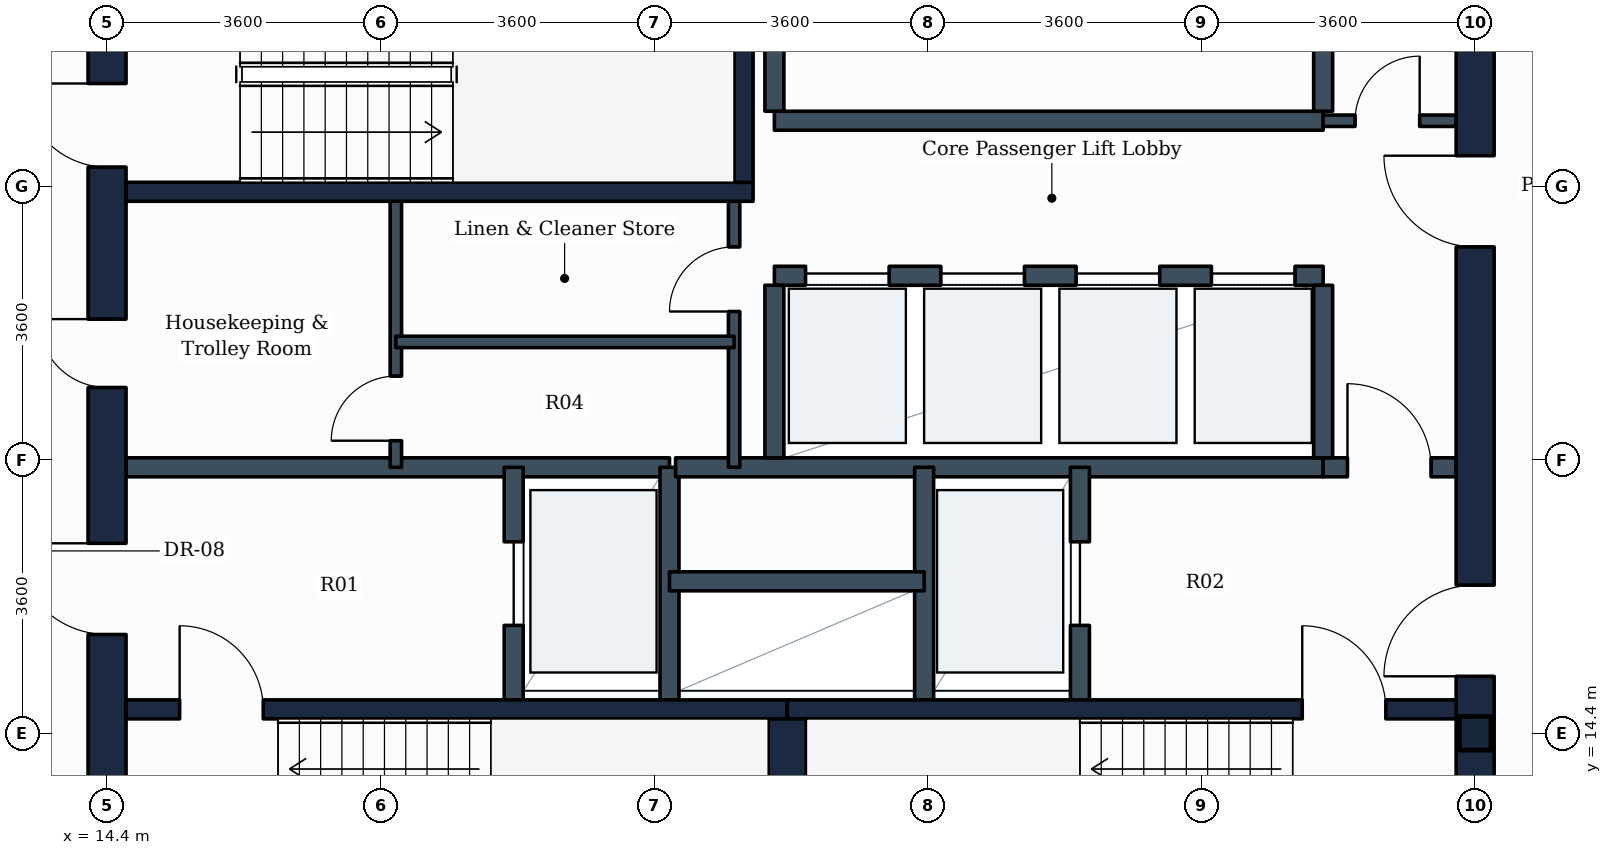
"""IFC4 building model, lengths in metres.
Left out: names, types, materials, properties, quantities, classifications, styles, units other than length and angle.
Written with IfcOpenShell. Run it as: python <this file> out.ifc"""

import sys

from ifc_helpers import new_model, si_unit, direction, frame, frame_2d, origin, origin_2d, place, context, subcontext, project, spatial, rectangle, i_section, extrude, element, fill, save


model = new_model("IFC4")
c1 = context("Model", 3, precision=1e-05, world=origin(), true_north=direction((0.0, 1.0)))
c2 = subcontext(c1, "Body", "Model", "MODEL_VIEW")
j1 = project(units=[si_unit("LENGTHUNIT", "METRE"), si_unit("PLANEANGLEUNIT", "RADIAN")], contexts=[c1])
p1 = place(None, origin())
s1 = spatial("IfcSite", under=j1, at=p1, CompositionType="ELEMENT")
p2 = place(p1, origin())
s2 = spatial("IfcBuilding", under=s1, at=p2, CompositionType="ELEMENT")
p3 = place(p2, frame((0.0, 0.0, 154.2)))
s3 = spatial("IfcBuildingStorey", under=s2, at=p3, CompositionType="ELEMENT", Elevation=154.2)
p4 = place(p3, frame((32.4, 14.4, 0.0), z_axis=(0.0, 0.0, 1.0), x_axis=(1.0, 0.0, 0.0)))
e1 = element("IfcColumn", 1, at=p4, inside=s3, PredefinedType="COLUMN", context=c2, shape_type="SweptSolid", body=[
    extrude(i_section(OverallWidth=0.416, OverallDepth=0.442, WebThickness=0.025, FlangeThickness=0.041, FilletRadius=0.015, at=origin_2d()), origin(), (0.0, 0.0, 1.0), 3.8),
])
p5 = place(p3, frame((14.4, 10.8, 0.0), z_axis=(0.0, 0.0, 1.0), x_axis=(0.0, 1.0, 0.0)))
e2 = element("IfcWall", 2, at=p5, inside=s3, PredefinedType="SHEAR", context=c2, shape_type="SweptSolid", body=[
    extrude(rectangle(XDim=14.4, YDim=0.5, at=frame_2d((7.2, 0.0))), origin(), (0.0, 0.0, 1.0), 3.55),
])
p6 = place(p5, frame((11.05, 0.0, 0.0)))
e3 = element("IfcOpeningElement", 3, at=p6, cuts=e2, PredefinedType="OPENING", context=c2, shape_type="SweptSolid", body=[
    extrude(rectangle(XDim=1.1, YDim=2.1, at=frame_2d((0.55, 1.05))), frame((0.0, 0.26, 0.0), z_axis=(0.0, -1.0, 0.0), x_axis=(1.0, 0.0, 0.0)), (0.0, 0.0, 1.0), 0.52),
])
p7 = place(p5, frame((4.9, 0.0, 0.0)))
e4 = element("IfcOpeningElement", 4, at=p7, cuts=e2, PredefinedType="OPENING", context=c2, shape_type="SweptSolid", body=[
    extrude(rectangle(XDim=1.2, YDim=2.1, at=frame_2d((0.6, 1.05))), frame((0.0, 0.26, 0.0), z_axis=(0.0, -1.0, 0.0), x_axis=(1.0, 0.0, 0.0)), (0.0, 0.0, 1.0), 0.52),
])
p8 = place(p5, frame((8.15, 0.0, 0.0)))
e5 = element("IfcOpeningElement", 5, at=p8, cuts=e2, PredefinedType="OPENING", context=c2, shape_type="SweptSolid", body=[
    extrude(rectangle(XDim=0.9, YDim=2.1, at=frame_2d((0.45, 1.05))), frame((0.0, 0.26, 0.0), z_axis=(0.0, -1.0, 0.0), x_axis=(1.0, 0.0, 0.0)), (0.0, 0.0, 1.0), 0.52),
])
p9 = place(p3, frame((32.4, 10.8, 0.0), z_axis=(0.0, 0.0, 1.0), x_axis=(0.0, 1.0, 0.0)))
e6 = element("IfcWall", 6, at=p9, inside=s3, PredefinedType="SHEAR", context=c2, shape_type="SweptSolid", body=[
    extrude(rectangle(XDim=14.4, YDim=0.5, at=frame_2d((7.2, 0.0))), origin(), (0.0, 0.0, 1.0), 3.55),
])
p10 = place(p9, frame((4.35, 0.0, 0.0)))
e7 = element("IfcOpeningElement", 7, at=p10, cuts=e6, PredefinedType="OPENING", context=c2, shape_type="SweptSolid", body=[
    extrude(rectangle(XDim=1.2, YDim=2.1, at=frame_2d((0.6, 1.05))), frame((0.0, 0.26, 0.0), z_axis=(0.0, -1.0, 0.0), x_axis=(1.0, 0.0, 0.0)), (0.0, 0.0, 1.0), 0.52),
])
p11 = place(p9, frame((10.0, 0.0, 0.0)))
e8 = element("IfcOpeningElement", 8, at=p11, cuts=e6, PredefinedType="OPENING", context=c2, shape_type="SweptSolid", body=[
    extrude(rectangle(XDim=1.2, YDim=2.1, at=frame_2d((0.6, 1.05))), frame((0.0, 0.26, 0.0), z_axis=(0.0, -1.0, 0.0), x_axis=(1.0, 0.0, 0.0)), (0.0, 0.0, 1.0), 0.52),
])
p12 = place(p3, frame((14.65, 14.715, 0.0), z_axis=(0.0, 0.0, 1.0), x_axis=(1.0, 0.0, 0.0)))
e9 = element("IfcWall", 9, at=p12, inside=s3, PredefinedType="SHEAR", context=c2, shape_type="SweptSolid", body=[
    extrude(rectangle(XDim=8.7, YDim=0.25, at=frame_2d((4.35, 0.0))), origin(), (0.0, 0.0, 1.0), 3.55),
])
p13 = place(p12, frame((0.705, 0.0, 0.0)))
e10 = element("IfcOpeningElement", 10, at=p13, cuts=e9, PredefinedType="OPENING", context=c2, shape_type="SweptSolid", body=[
    extrude(rectangle(XDim=1.1, YDim=2.1, at=frame_2d((0.55, 1.05))), frame((0.0, 0.135, 0.0), z_axis=(0.0, -1.0, 0.0), x_axis=(1.0, 0.0, 0.0)), (0.0, 0.0, 1.0), 0.27),
])
p14 = place(p3, frame((23.35, 14.715, 0.0), z_axis=(0.0, 0.0, 1.0), x_axis=(1.0, 0.0, 0.0)))
e11 = element("IfcWall", 11, at=p14, inside=s3, PredefinedType="SHEAR", context=c2, shape_type="SweptSolid", body=[
    extrude(rectangle(XDim=8.8, YDim=0.25, at=frame_2d((4.4, 0.0))), origin(), (0.0, 0.0, 1.0), 3.55),
])
p15 = place(p14, frame((6.775, 0.0, 0.0)))
e12 = element("IfcOpeningElement", 12, at=p15, cuts=e11, PredefinedType="OPENING", context=c2, shape_type="SweptSolid", body=[
    extrude(rectangle(XDim=1.1, YDim=2.1, at=frame_2d((0.55, 1.05))), frame((0.0, 0.135, 0.0), z_axis=(0.0, -1.0, 0.0), x_axis=(1.0, 0.0, 0.0)), (0.0, 0.0, 1.0), 0.27),
])
p16 = place(p3, frame((23.35, 11.75, 0.0), z_axis=(0.0, 0.0, 1.0), x_axis=(0.0, 1.0, 0.0)))
e13 = element("IfcWall", 13, at=p16, inside=s3, PredefinedType="SHEAR", context=c2, shape_type="SweptSolid", body=[
    extrude(rectangle(XDim=2.84, YDim=0.5, at=frame_2d((1.42, 0.0))), origin(), (0.0, 0.0, 1.0), 3.55),
])
p17 = place(p3, frame((14.65, 21.525, 0.0), z_axis=(0.0, 0.0, 1.0), x_axis=(1.0, 0.0, 0.0)))
e14 = element("IfcWall", 14, at=p17, inside=s3, PredefinedType="SHEAR", context=c2, shape_type="SweptSolid", body=[
    extrude(rectangle(XDim=8.25, YDim=0.25, at=frame_2d((4.125, 0.0))), origin(), (0.0, 0.0, 1.0), 3.55),
])
p18 = place(p3, frame((22.775, 21.65, 0.0), z_axis=(0.0, 0.0, 1.0), x_axis=(0.0, 1.0, 0.0)))
e15 = element("IfcWall", 15, at=p18, inside=s3, PredefinedType="SHEAR", context=c2, shape_type="SweptSolid", body=[
    extrude(rectangle(XDim=2.84, YDim=0.25, at=frame_2d((1.42, 0.0))), origin(), (0.0, 0.0, 1.0), 3.55),
])
p19 = place(p3, frame((14.65, 17.9, 0.0), z_axis=(0.0, 0.0, 1.0), x_axis=(1.0, 0.0, 0.0)))
e16 = element("IfcWall", 16, at=p19, inside=s3, PredefinedType="PARTITIONING", context=c2, shape_type="SweptSolid", body=[
    extrude(rectangle(XDim=7.15, YDim=0.25, at=frame_2d((3.575, 0.0))), origin(), (0.0, 0.0, 1.0), 3.535),
])
p20 = place(p3, frame((19.75, 14.84, 0.0), z_axis=(0.0, 0.0, 1.0), x_axis=(0.0, 1.0, 0.0)))
e17 = element("IfcWall", 17, at=p20, inside=s3, PredefinedType="PARTITIONING", context=c2, shape_type="SweptSolid", body=[
    extrude(rectangle(XDim=3.06, YDim=0.25, at=frame_2d((1.53, 0.0))), origin(), (0.0, 0.0, 1.0), 3.535),
])
p21 = place(p20, frame((0.98, 0.0, 0.0)))
e18 = element("IfcOpeningElement", 18, at=p21, cuts=e17, PredefinedType="OPENING", context=c2, shape_type="SweptSolid", body=[
    extrude(rectangle(XDim=1.1, YDim=2.1, at=frame_2d((0.55, 1.05))), frame((0.0, 0.135, 0.0), z_axis=(0.0, -1.0, 0.0), x_axis=(1.0, 0.0, 0.0)), (0.0, 0.0, 1.0), 0.27),
])
p22 = place(p3, frame((21.8, 14.84, 0.0), z_axis=(0.0, 0.0, 1.0), x_axis=(0.0, 1.0, 0.0)))
e19 = element("IfcWall", 19, at=p22, inside=s3, PredefinedType="PARTITIONING", context=c2, shape_type="SweptSolid", body=[
    extrude(rectangle(XDim=3.06, YDim=0.25, at=frame_2d((1.53, 0.0))), origin(), (0.0, 0.0, 1.0), 3.535),
])
p23 = place(p3, frame((21.88, 17.9, 0.0), z_axis=(0.0, 0.0, 1.0), x_axis=(1.0, 0.0, 0.0)))
e20 = element("IfcWall", 20, at=p23, inside=s3, PredefinedType="PARTITIONING", context=c2, shape_type="SweptSolid", body=[
    extrude(rectangle(XDim=8.52, YDim=0.25, at=frame_2d((4.26, 0.0))), origin(), (0.0, 0.0, 1.0), 3.535),
])
p24 = place(p3, frame((30.4, 17.9, 0.0), z_axis=(0.0, 0.0, 1.0), x_axis=(1.0, 0.0, 0.0)))
e21 = element("IfcWall", 21, at=p24, inside=s3, PredefinedType="PARTITIONING", context=c2, shape_type="SweptSolid", body=[
    extrude(rectangle(XDim=1.75, YDim=0.25, at=frame_2d((0.875, 0.0))), origin(), (0.0, 0.0, 1.0), 3.535),
])
p25 = place(p24, frame((0.32, 0.0, 0.0)))
e22 = element("IfcOpeningElement", 22, at=p25, cuts=e21, PredefinedType="OPENING", context=c2, shape_type="SweptSolid", body=[
    extrude(rectangle(XDim=1.1, YDim=2.1, at=frame_2d((0.55, 1.05))), frame((0.0, 0.135, 0.0), z_axis=(0.0, -1.0, 0.0), x_axis=(1.0, 0.0, 0.0)), (0.0, 0.0, 1.0), 0.27),
])
p26 = place(p3, frame((25.15, 14.84, 0.0), z_axis=(0.0, 0.0, 1.0), x_axis=(0.0, 1.0, 0.0)))
e23 = element("IfcWall", 23, at=p26, inside=s3, PredefinedType="PARTITIONING", context=c2, shape_type="SweptSolid", body=[
    extrude(rectangle(XDim=3.06, YDim=0.25, at=frame_2d((1.53, 0.0))), origin(), (0.0, 0.0, 1.0), 3.535),
])
p27 = place(p3, frame((27.2, 14.84, 0.0), z_axis=(0.0, 0.0, 1.0), x_axis=(0.0, 1.0, 0.0)))
e24 = element("IfcWall", 24, at=p27, inside=s3, PredefinedType="PARTITIONING", context=c2, shape_type="SweptSolid", body=[
    extrude(rectangle(XDim=3.06, YDim=0.25, at=frame_2d((1.53, 0.0))), origin(), (0.0, 0.0, 1.0), 3.535),
])
p28 = place(p27, frame((0.98, 0.0, 0.0)))
e25 = element("IfcOpeningElement", 25, at=p28, cuts=e24, PredefinedType="OPENING", context=c2, shape_type="SweptSolid", body=[
    extrude(rectangle(XDim=1.1, YDim=2.1, at=frame_2d((0.55, 1.05))), frame((0.0, 0.135, 0.0), z_axis=(0.0, -1.0, 0.0), x_axis=(1.0, 0.0, 0.0)), (0.0, 0.0, 1.0), 0.27),
])
p29 = place(p3, frame((21.8, 16.4, 0.0), z_axis=(0.0, 0.0, 1.0), x_axis=(1.0, 0.0, 0.0)))
e26 = element("IfcWall", 26, at=p29, inside=s3, PredefinedType="PARTITIONING", context=c2, shape_type="SweptSolid", body=[
    extrude(rectangle(XDim=3.35, YDim=0.25, at=frame_2d((1.675, 0.0))), origin(), (0.0, 0.0, 1.0), 3.535),
])
p30 = place(p3, frame((23.18, 20.42, 0.0), z_axis=(0.0, 0.0, 1.0), x_axis=(1.0, 0.0, 0.0)))
e27 = element("IfcWall", 27, at=p30, inside=s3, PredefinedType="PARTITIONING", context=c2, shape_type="SweptSolid", body=[
    extrude(rectangle(XDim=7.22, YDim=0.25, at=frame_2d((3.61, 0.0))), origin(), (0.0, 0.0, 1.0), 3.535),
])
p31 = place(p30, frame((0.41, 0.0, 0.0)))
e28 = element("IfcOpeningElement", 28, at=p31, cuts=e27, PredefinedType="OPENING", context=c2, shape_type="SweptSolid", body=[
    extrude(rectangle(XDim=1.1, YDim=2.1, at=frame_2d((0.55, 1.05))), frame((0.0, 0.135, 0.0), z_axis=(0.0, -1.0, 0.0), x_axis=(1.0, 0.0, 0.0)), (0.0, 0.0, 1.0), 0.27),
])
p32 = place(p30, frame((2.19, 0.0, 0.0)))
e29 = element("IfcOpeningElement", 29, at=p32, cuts=e27, PredefinedType="OPENING", context=c2, shape_type="SweptSolid", body=[
    extrude(rectangle(XDim=1.1, YDim=2.1, at=frame_2d((0.55, 1.05))), frame((0.0, 0.135, 0.0), z_axis=(0.0, -1.0, 0.0), x_axis=(1.0, 0.0, 0.0)), (0.0, 0.0, 1.0), 0.27),
])
p33 = place(p30, frame((3.97, 0.0, 0.0)))
e30 = element("IfcOpeningElement", 30, at=p33, cuts=e27, PredefinedType="OPENING", context=c2, shape_type="SweptSolid", body=[
    extrude(rectangle(XDim=1.1, YDim=2.1, at=frame_2d((0.55, 1.05))), frame((0.0, 0.135, 0.0), z_axis=(0.0, -1.0, 0.0), x_axis=(1.0, 0.0, 0.0)), (0.0, 0.0, 1.0), 0.27),
])
p34 = place(p30, frame((5.75, 0.0, 0.0)))
e31 = element("IfcOpeningElement", 31, at=p34, cuts=e27, PredefinedType="OPENING", context=c2, shape_type="SweptSolid", body=[
    extrude(rectangle(XDim=1.1, YDim=2.1, at=frame_2d((0.55, 1.05))), frame((0.0, 0.135, 0.0), z_axis=(0.0, -1.0, 0.0), x_axis=(1.0, 0.0, 0.0)), (0.0, 0.0, 1.0), 0.27),
])
for number, where, z_axis, x_axis in (
    (32, (23.18, 18.025, 0.0), (0.0, 0.0, 1.0), (0.0, 1.0, 0.0)),
    (33, (30.4, 18.025, 0.0), (0.0, 0.0, 1.0), (0.0, 1.0, 0.0)),
):
    element("IfcWall", number, at=place(p3, frame(where, z_axis=z_axis, x_axis=x_axis)), inside=s3, PredefinedType="PARTITIONING", context=c2, shape_type="SweptSolid", body=[
        extrude(rectangle(XDim=2.27, YDim=0.25, at=frame_2d((1.135, 0.0))), origin(), (0.0, 0.0, 1.0), 3.535),
    ])
p35 = place(p3, frame((23.18, 22.46, 0.0), z_axis=(0.0, 0.0, 1.0), x_axis=(1.0, 0.0, 0.0)))
e34 = element("IfcWall", 34, at=p35, inside=s3, PredefinedType="PARTITIONING", context=c2, shape_type="SweptSolid", body=[
    extrude(rectangle(XDim=7.22, YDim=0.25, at=frame_2d((3.61, 0.0))), origin(), (0.0, 0.0, 1.0), 3.535),
])
for number, where, z_axis, x_axis in (
    (35, (23.18, 22.585, 0.0), (0.0, 0.0, 1.0), (0.0, 1.0, 0.0)),
    (36, (30.4, 22.585, 0.0), (0.0, 0.0, 1.0), (0.0, 1.0, 0.0)),
):
    element("IfcWall", number, at=place(p3, frame(where, z_axis=z_axis, x_axis=x_axis)), inside=s3, PredefinedType="PARTITIONING", context=c2, shape_type="SweptSolid", body=[
        extrude(rectangle(XDim=2.315, YDim=0.25, at=frame_2d((1.157, 0.0))), origin(), (0.0, 0.0, 1.0), 3.535),
    ])
p36 = place(p3, frame((22.65, 17.9, 0.0), z_axis=(0.0, 0.0, 1.0), x_axis=(0.0, 1.0, 0.0)))
e37 = element("IfcWall", 37, at=p36, inside=s3, PredefinedType="PARTITIONING", context=c2, shape_type="SweptSolid", body=[
    extrude(rectangle(XDim=3.625, YDim=0.15, at=frame_2d((1.812, 0.0))), origin(), (0.0, 0.0, 1.0), 3.535),
])
p37 = place(p36, frame((2.05, 0.0, 0.0)))
e38 = element("IfcOpeningElement", 38, at=p37, cuts=e37, PredefinedType="OPENING", context=c2, shape_type="SweptSolid", body=[
    extrude(rectangle(XDim=0.85, YDim=2.1, at=frame_2d((0.425, 1.05))), frame((0.0, 0.085, 0.0), z_axis=(0.0, -1.0, 0.0), x_axis=(1.0, 0.0, 0.0)), (0.0, 0.0, 1.0), 0.17),
])
p38 = place(p3, frame((18.2, 17.9, 0.0), z_axis=(0.0, 0.0, 1.0), x_axis=(0.0, 1.0, 0.0)))
e39 = element("IfcWall", 39, at=p38, inside=s3, PredefinedType="PARTITIONING", context=c2, shape_type="SweptSolid", body=[
    extrude(rectangle(XDim=3.625, YDim=0.15, at=frame_2d((1.812, 0.0))), origin(), (0.0, 0.0, 1.0), 3.535),
])
p39 = place(p38, frame((0.35, 0.0, 0.0)))
e40 = element("IfcOpeningElement", 40, at=p39, cuts=e39, PredefinedType="OPENING", context=c2, shape_type="SweptSolid", body=[
    extrude(rectangle(XDim=0.85, YDim=2.1, at=frame_2d((0.425, 1.05))), frame((0.0, 0.085, 0.0), z_axis=(0.0, -1.0, 0.0), x_axis=(1.0, 0.0, 0.0)), (0.0, 0.0, 1.0), 0.17),
])
p40 = place(p3, frame((18.2, 19.55, 0.0), z_axis=(0.0, 0.0, 1.0), x_axis=(1.0, 0.0, 0.0)))
e41 = element("IfcWall", 41, at=p40, inside=s3, PredefinedType="PARTITIONING", context=c2, shape_type="SweptSolid", body=[
    extrude(rectangle(XDim=4.45, YDim=0.15, at=frame_2d((2.225, 0.0))), origin(), (0.0, 0.0, 1.0), 3.535),
])
p41 = place(p3, frame((30.4, 22.46, 0.0), z_axis=(0.0, 0.0, 1.0), x_axis=(1.0, 0.0, 0.0)))
e42 = element("IfcWall", 42, at=p41, inside=s3, PredefinedType="PARTITIONING", context=c2, shape_type="SweptSolid", body=[
    extrude(rectangle(XDim=1.75, YDim=0.15, at=frame_2d((0.875, 0.0))), origin(), (0.0, 0.0, 1.0), 3.535),
])
p42 = place(p41, frame((0.42, 0.0, 0.0)))
e43 = element("IfcOpeningElement", 43, at=p42, cuts=e42, PredefinedType="OPENING", context=c2, shape_type="SweptSolid", body=[
    extrude(rectangle(XDim=0.85, YDim=2.1, at=frame_2d((0.425, 1.05))), frame((0.0, 0.085, 0.0), z_axis=(0.0, -1.0, 0.0), x_axis=(1.0, 0.0, 0.0)), (0.0, 0.0, 1.0), 0.17),
])
p43 = place(p13, origin())
e44 = element("IfcDoor", 44, at=p43, inside=s3, OperationType="SINGLE_SWING_LEFT", PredefinedType="DOOR", context=c2, shape_type="SweptSolid", body=[
    extrude(rectangle(XDim=1.1, YDim=2.1, at=frame_2d((0.55, 1.05))), frame((0.0, 0.025, 0.0), z_axis=(0.0, -1.0, 0.0), x_axis=(1.0, 0.0, 0.0)), (0.0, 0.0, 1.0), 0.05),
])
fill(e10, e44)
p44 = place(p15, origin())
e45 = element("IfcDoor", 45, at=p44, inside=s3, OperationType="SINGLE_SWING_LEFT", PredefinedType="DOOR", context=c2, shape_type="SweptSolid", body=[
    extrude(rectangle(XDim=1.1, YDim=2.1, at=frame_2d((0.55, 1.05))), frame((0.0, 0.025, 0.0), z_axis=(0.0, -1.0, 0.0), x_axis=(1.0, 0.0, 0.0)), (0.0, 0.0, 1.0), 0.05),
])
fill(e12, e45)
p45 = place(p6, origin())
e46 = element("IfcDoor", 46, at=p45, inside=s3, OperationType="SINGLE_SWING_RIGHT", PredefinedType="DOOR", context=c2, shape_type="SweptSolid", body=[
    extrude(rectangle(XDim=1.1, YDim=2.1, at=frame_2d((0.55, 1.05))), frame((0.0, 0.025, 0.0), z_axis=(0.0, -1.0, 0.0), x_axis=(1.0, 0.0, 0.0)), (0.0, 0.0, 1.0), 0.05),
])
fill(e3, e46)
p46 = place(p21, origin())
e47 = element("IfcDoor", 47, at=p46, inside=s3, OperationType="SLIDING_TO_LEFT", PredefinedType="DOOR", context=c2, shape_type="SweptSolid", body=[
    extrude(rectangle(XDim=1.1, YDim=2.1, at=frame_2d((0.55, 1.05))), frame((0.0, 0.025, 0.0), z_axis=(0.0, -1.0, 0.0), x_axis=(1.0, 0.0, 0.0)), (0.0, 0.0, 1.0), 0.05),
])
fill(e18, e47)
p47 = place(p28, origin())
e48 = element("IfcDoor", 48, at=p47, inside=s3, OperationType="SLIDING_TO_LEFT", PredefinedType="DOOR", context=c2, shape_type="SweptSolid", body=[
    extrude(rectangle(XDim=1.1, YDim=2.1, at=frame_2d((0.55, 1.05))), frame((0.0, 0.025, 0.0), z_axis=(0.0, -1.0, 0.0), x_axis=(1.0, 0.0, 0.0)), (0.0, 0.0, 1.0), 0.05),
])
fill(e25, e48)
p48 = place(p7, origin())
e49 = element("IfcDoor", 49, at=p48, inside=s3, OperationType="SINGLE_SWING_RIGHT", PredefinedType="DOOR", context=c2, shape_type="SweptSolid", body=[
    extrude(rectangle(XDim=1.2, YDim=2.1, at=frame_2d((0.6, 1.05))), frame((0.0, 0.025, 0.0), z_axis=(0.0, -1.0, 0.0), x_axis=(1.0, 0.0, 0.0)), (0.0, 0.0, 1.0), 0.05),
])
fill(e4, e49)
p49 = place(p10, origin())
e50 = element("IfcDoor", 50, at=p49, inside=s3, OperationType="SINGLE_SWING_LEFT", PredefinedType="DOOR", context=c2, shape_type="SweptSolid", body=[
    extrude(rectangle(XDim=1.2, YDim=2.1, at=frame_2d((0.6, 1.05))), frame((0.0, 0.025, 0.0), z_axis=(0.0, -1.0, 0.0), x_axis=(1.0, 0.0, 0.0)), (0.0, 0.0, 1.0), 0.05),
])
fill(e7, e50)
p50 = place(p25, origin())
e51 = element("IfcDoor", 51, at=p50, inside=s3, OperationType="SINGLE_SWING_LEFT", PredefinedType="DOOR", context=c2, shape_type="SweptSolid", body=[
    extrude(rectangle(XDim=1.1, YDim=2.1, at=frame_2d((0.55, 1.05))), frame((0.0, 0.025, 0.0), z_axis=(0.0, -1.0, 0.0), x_axis=(1.0, 0.0, 0.0)), (0.0, 0.0, 1.0), 0.05),
])
fill(e22, e51)
p51 = place(p31, origin())
e52 = element("IfcDoor", 52, at=p51, inside=s3, OperationType="SLIDING_TO_LEFT", PredefinedType="DOOR", context=c2, shape_type="SweptSolid", body=[
    extrude(rectangle(XDim=1.1, YDim=2.1, at=frame_2d((0.55, 1.05))), frame((0.0, 0.025, 0.0), z_axis=(0.0, -1.0, 0.0), x_axis=(1.0, 0.0, 0.0)), (0.0, 0.0, 1.0), 0.05),
])
fill(e28, e52)
p52 = place(p32, origin())
e53 = element("IfcDoor", 53, at=p52, inside=s3, OperationType="SLIDING_TO_LEFT", PredefinedType="DOOR", context=c2, shape_type="SweptSolid", body=[
    extrude(rectangle(XDim=1.1, YDim=2.1, at=frame_2d((0.55, 1.05))), frame((0.0, 0.025, 0.0), z_axis=(0.0, -1.0, 0.0), x_axis=(1.0, 0.0, 0.0)), (0.0, 0.0, 1.0), 0.05),
])
fill(e29, e53)
p53 = place(p33, origin())
e54 = element("IfcDoor", 54, at=p53, inside=s3, OperationType="SLIDING_TO_LEFT", PredefinedType="DOOR", context=c2, shape_type="SweptSolid", body=[
    extrude(rectangle(XDim=1.1, YDim=2.1, at=frame_2d((0.55, 1.05))), frame((0.0, 0.025, 0.0), z_axis=(0.0, -1.0, 0.0), x_axis=(1.0, 0.0, 0.0)), (0.0, 0.0, 1.0), 0.05),
])
fill(e30, e54)
p54 = place(p34, origin())
e55 = element("IfcDoor", 55, at=p54, inside=s3, OperationType="SLIDING_TO_LEFT", PredefinedType="DOOR", context=c2, shape_type="SweptSolid", body=[
    extrude(rectangle(XDim=1.1, YDim=2.1, at=frame_2d((0.55, 1.05))), frame((0.0, 0.025, 0.0), z_axis=(0.0, -1.0, 0.0), x_axis=(1.0, 0.0, 0.0)), (0.0, 0.0, 1.0), 0.05),
])
fill(e31, e55)
p55 = place(p11, origin())
e56 = element("IfcDoor", 56, at=p55, inside=s3, OperationType="SINGLE_SWING_RIGHT", PredefinedType="DOOR", context=c2, shape_type="SweptSolid", body=[
    extrude(rectangle(XDim=1.2, YDim=2.1, at=frame_2d((0.6, 1.05))), frame((0.0, 0.025, 0.0), z_axis=(0.0, -1.0, 0.0), x_axis=(1.0, 0.0, 0.0)), (0.0, 0.0, 1.0), 0.05),
])
fill(e8, e56)
p56 = place(p8, origin())
e57 = element("IfcDoor", 57, at=p56, inside=s3, OperationType="SINGLE_SWING_RIGHT", PredefinedType="DOOR", context=c2, shape_type="SweptSolid", body=[
    extrude(rectangle(XDim=0.9, YDim=2.1, at=frame_2d((0.45, 1.05))), frame((0.0, 0.025, 0.0), z_axis=(0.0, -1.0, 0.0), x_axis=(1.0, 0.0, 0.0)), (0.0, 0.0, 1.0), 0.05),
])
fill(e5, e57)
p57 = place(p39, origin())
e58 = element("IfcDoor", 58, at=p57, inside=s3, OperationType="SINGLE_SWING_LEFT", PredefinedType="DOOR", context=c2, shape_type="SweptSolid", body=[
    extrude(rectangle(XDim=0.85, YDim=2.1, at=frame_2d((0.425, 1.05))), frame((0.0, 0.025, 0.0), z_axis=(0.0, -1.0, 0.0), x_axis=(1.0, 0.0, 0.0)), (0.0, 0.0, 1.0), 0.05),
])
fill(e40, e58)
p58 = place(p37, origin())
e59 = element("IfcDoor", 59, at=p58, inside=s3, OperationType="SINGLE_SWING_LEFT", PredefinedType="DOOR", context=c2, shape_type="SweptSolid", body=[
    extrude(rectangle(XDim=0.85, YDim=2.1, at=frame_2d((0.425, 1.05))), frame((0.0, 0.025, 0.0), z_axis=(0.0, -1.0, 0.0), x_axis=(1.0, 0.0, 0.0)), (0.0, 0.0, 1.0), 0.05),
])
fill(e38, e59)
p59 = place(p42, origin())
e60 = element("IfcDoor", 60, at=p59, inside=s3, OperationType="SINGLE_SWING_RIGHT", PredefinedType="DOOR", context=c2, shape_type="SweptSolid", body=[
    extrude(rectangle(XDim=0.85, YDim=2.1, at=frame_2d((0.425, 1.05))), frame((0.0, 0.025, 0.0), z_axis=(0.0, -1.0, 0.0), x_axis=(1.0, 0.0, 0.0)), (0.0, 0.0, 1.0), 0.05),
])
fill(e43, e60)
save(model, sys.argv[1])
